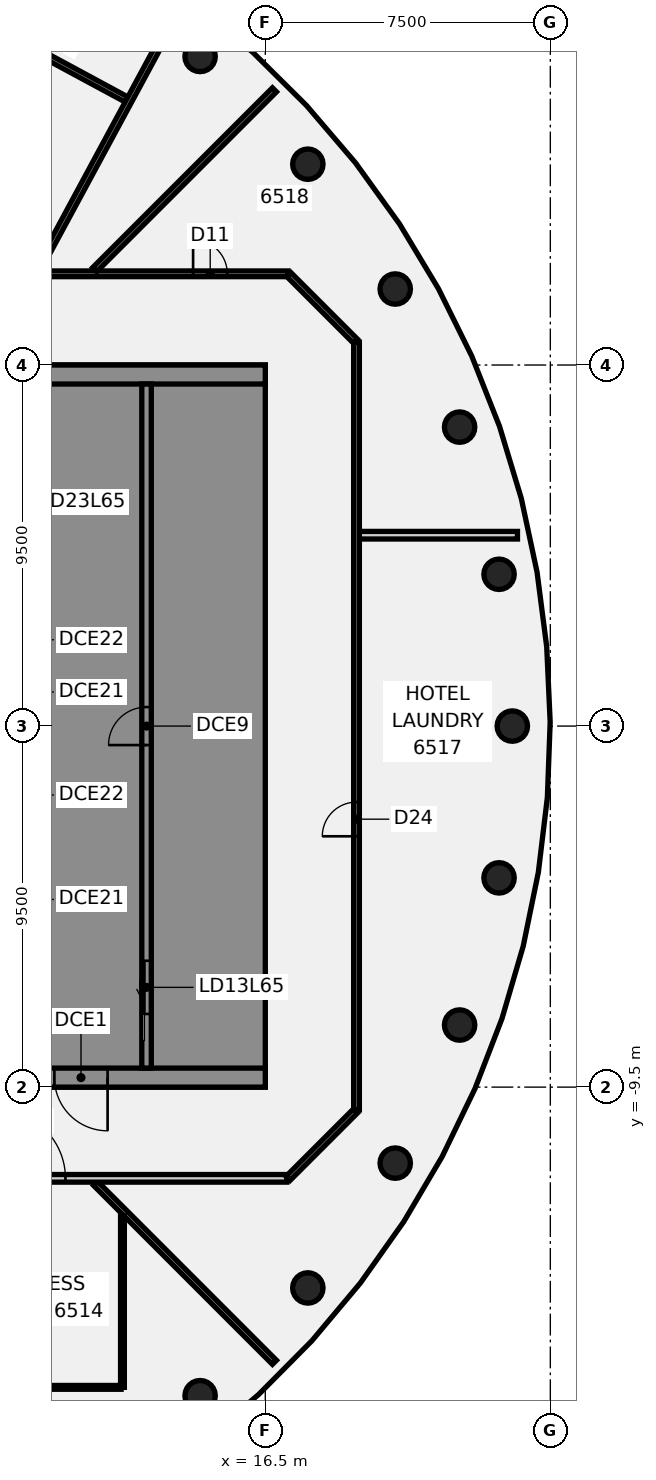
"""IFC4 building model, lengths in metres.
Left out: names, types, materials, properties, quantities, classifications, styles, units other than length and angle.
Written with IfcOpenShell. Run it as: python <this file> out.ifc"""

import sys

from ifc_helpers import new_model, si_unit, direction, frame, frame_2d, origin, origin_2d, place, context, subcontext, project, spatial, polyline, rectangle, circle, outline, extrude, element, fill, save


model = new_model("IFC4")
c1 = context("Model", 3, precision=1e-05, world=origin(), true_north=direction((0.0, 1.0)))
c2 = subcontext(c1, "Body", "Model", "MODEL_VIEW")
j1 = project(units=[si_unit("LENGTHUNIT", "METRE"), si_unit("PLANEANGLEUNIT", "RADIAN")], contexts=[c1])
p1 = place(None, origin())
s1 = spatial("IfcSite", under=j1, at=p1, CompositionType="ELEMENT")
p2 = place(p1, origin())
s2 = spatial("IfcBuilding", under=s1, at=p2, CompositionType="ELEMENT")
p3 = place(p2, frame((0.0, 0.0, 256.8)))
s3 = spatial("IfcBuildingStorey", under=s2, at=p3, CompositionType="ELEMENT", Elevation=256.8)
for number, where, z_axis, x_axis in (
    (1, (23.0, 0.0, -0.14), (0.0, 0.0, 1.0), (1.0, 0.0, 0.0)),
    (2, (22.651, 3.994, -0.14), (0.0, 0.0, 1.0), (1.0, 0.0, 0.0)),
    (3, (21.613, 7.866, -0.14), (0.0, 0.0, 1.0), (1.0, 0.0, 0.0)),
    (4, (19.919, 11.5, -0.14), (0.0, 0.0, 1.0), (1.0, 0.0, 0.0)),
    (5, (17.619, 14.784, -0.14), (0.0, 0.0, 1.0), (1.0, 0.0, 0.0)),
    (6, (14.784, 17.619, -0.14), (0.0, 0.0, 1.0), (1.0, 0.0, 0.0)),
    (7, (14.784, -17.619, -0.14), (0.0, 0.0, 1.0), (1.0, 0.0, 0.0)),
    (8, (17.619, -14.784, -0.14), (0.0, 0.0, 1.0), (1.0, 0.0, 0.0)),
    (9, (19.919, -11.5, -0.14), (0.0, 0.0, 1.0), (1.0, 0.0, 0.0)),
    (10, (21.613, -7.866, -0.14), (0.0, 0.0, 1.0), (1.0, 0.0, 0.0)),
    (11, (22.651, -3.994, -0.14), (0.0, 0.0, 1.0), (1.0, 0.0, 0.0)),
):
    element("IfcColumn", number, at=place(p3, frame(where, z_axis=z_axis, x_axis=x_axis)), inside=s3, PredefinedType="COLUMN", context=c2, shape_type="SweptSolid", body=[
        extrude(circle(Radius=0.4, at=origin_2d()), origin(), (0.0, 0.0, 1.0), 3.6),
    ])
p4 = place(p3, frame((12.034, -12.034, 0.0), z_axis=(0.0, 0.0, 1.0), x_axis=(0.707106781187, -0.707106781187, 0.0)))
e12 = element("IfcWall", 12, at=p4, inside=s3, PredefinedType="PARTITIONING", context=c2, shape_type="SweptSolid", body=[
    extrude(rectangle(XDim=6.655, YDim=0.15, at=frame_2d((3.328, 0.0))), origin(), (0.0, 0.0, 1.0), 2.864),
])
p5 = place(p3, frame((17.128, 11.872, 0.0), z_axis=(0.0, 0.0, 1.0), x_axis=(0.707106781187, -0.707106781187, 0.0)))
e13 = element("IfcWall", 13, at=p5, inside=s3, PredefinedType="PARTITIONING", context=c2, shape_type="SweptSolid", body=[
    extrude(rectangle(XDim=2.465, YDim=0.15, at=frame_2d((1.232, 0.0))), origin(), (0.0, 0.0, 1.0), 2.864),
])
p6 = place(p3, frame((0.302, 23.258, 0.0), z_axis=(0.0, 0.0, 1.0), x_axis=(0.88000876601, -0.474957442037, 0.0)))
e14 = element("IfcWall", 14, at=p6, inside=s3, PredefinedType="PARTITIONING", context=c2, shape_type="SweptSolid", body=[
    extrude(rectangle(XDim=14.256, YDim=0.15, at=frame_2d((7.128, 0.0))), origin(), (0.0, 0.0, 1.0), 2.864),
])
p7 = place(p6, frame((4.8, 0.0, 0.0)))
e15 = element("IfcOpeningElement", 15, at=p7, cuts=e14, PredefinedType="OPENING", context=c2, shape_type="SweptSolid", body=[
    extrude(rectangle(XDim=0.9, YDim=2.1, at=frame_2d((0.45, 1.05))), frame((0.0, 0.085, 0.0), z_axis=(0.0, -1.0, 0.0), x_axis=(1.0, 0.0, 0.0)), (0.0, 0.0, 1.0), 0.17),
])
p8 = place(p3, frame((-17.1, -11.9, 0.0), z_axis=(0.0, 0.0, 1.0), x_axis=(1.0, 0.0, 0.0)))
e16 = element("IfcWall", 16, at=p8, inside=s3, PredefinedType="PARTITIONING", context=c2, shape_type="SweptSolid", body=[
    extrude(rectangle(XDim=34.165, YDim=0.2, at=frame_2d((17.083, 0.0))), origin(), (0.0, 0.0, 1.0), 2.864),
])
p9 = place(p8, frame((6.1, 0.0, 0.0)))
e17 = element("IfcOpeningElement", 17, at=p9, cuts=e16, PredefinedType="OPENING", context=c2, shape_type="SweptSolid", body=[
    extrude(rectangle(XDim=0.9, YDim=2.1, at=frame_2d((0.45, 1.05))), frame((0.0, 0.11, 0.0), z_axis=(0.0, -1.0, 0.0), x_axis=(1.0, 0.0, 0.0)), (0.0, 0.0, 1.0), 0.22),
])
p10 = place(p8, frame((26.541, 0.0, 0.0)))
e18 = element("IfcOpeningElement", 18, at=p10, cuts=e16, PredefinedType="OPENING", context=c2, shape_type="SweptSolid", body=[
    extrude(rectangle(XDim=1.8, YDim=2.1, at=frame_2d((0.9, 1.05))), frame((0.0, 0.11, 0.0), z_axis=(0.0, -1.0, 0.0), x_axis=(1.0, 0.0, 0.0)), (0.0, 0.0, 1.0), 0.22),
])
p11 = place(p8, frame((17.778, 0.0, 0.0)))
e19 = element("IfcOpeningElement", 19, at=p11, cuts=e16, PredefinedType="OPENING", context=c2, shape_type="SweptSolid", body=[
    extrude(rectangle(XDim=1.8, YDim=2.1, at=frame_2d((0.9, 1.05))), frame((0.0, 0.11, 0.0), z_axis=(0.0, -1.0, 0.0), x_axis=(1.0, 0.0, 0.0)), (0.0, 0.0, 1.0), 0.22),
])
p12 = place(p8, frame((10.359, 0.0, 0.0)))
e20 = element("IfcOpeningElement", 20, at=p12, cuts=e16, PredefinedType="OPENING", context=c2, shape_type="SweptSolid", body=[
    extrude(rectangle(XDim=0.9, YDim=2.1, at=frame_2d((0.45, 1.05))), frame((0.0, 0.11, 0.0), z_axis=(0.0, -1.0, 0.0), x_axis=(1.0, 0.0, 0.0)), (0.0, 0.0, 1.0), 0.22),
])
p13 = place(p8, frame((1.65, 0.0, 0.0)))
e21 = element("IfcOpeningElement", 21, at=p13, cuts=e16, PredefinedType="OPENING", context=c2, shape_type="SweptSolid", body=[
    extrude(rectangle(XDim=0.9, YDim=2.1, at=frame_2d((0.45, 1.05))), frame((0.0, 0.11, 0.0), z_axis=(0.0, -1.0, 0.0), x_axis=(1.0, 0.0, 0.0)), (0.0, 0.0, 1.0), 0.22),
])
p14 = place(p3, frame((-17.065, 11.9, 0.0), z_axis=(0.0, 0.0, 1.0), x_axis=(1.0, 0.0, 0.0)))
e22 = element("IfcWall", 22, at=p14, inside=s3, PredefinedType="PARTITIONING", context=c2, shape_type="SweptSolid", body=[
    extrude(rectangle(XDim=34.165, YDim=0.15, at=frame_2d((17.083, 0.0))), origin(), (0.0, 0.0, 1.0), 2.864),
])
p15 = place(p14, frame((22.777, 0.0, 0.0)))
e23 = element("IfcOpeningElement", 23, at=p15, cuts=e22, PredefinedType="OPENING", context=c2, shape_type="SweptSolid", body=[
    extrude(rectangle(XDim=1.8, YDim=2.1, at=frame_2d((0.9, 1.05))), frame((0.0, 0.085, 0.0), z_axis=(0.0, -1.0, 0.0), x_axis=(1.0, 0.0, 0.0)), (0.0, 0.0, 1.0), 0.17),
])
p16 = place(p14, frame((31.665, 0.0, 0.0)))
e24 = element("IfcOpeningElement", 24, at=p16, cuts=e22, PredefinedType="OPENING", context=c2, shape_type="SweptSolid", body=[
    extrude(rectangle(XDim=0.9, YDim=2.1, at=frame_2d((0.45, 1.05))), frame((0.0, 0.085, 0.0), z_axis=(0.0, -1.0, 0.0), x_axis=(1.0, 0.0, 0.0)), (0.0, 0.0, 1.0), 0.17),
])
p17 = place(p14, frame((11.615, 0.0, 0.0)))
e25 = element("IfcOpeningElement", 25, at=p17, cuts=e22, PredefinedType="OPENING", context=c2, shape_type="SweptSolid", body=[
    extrude(rectangle(XDim=1.8, YDim=2.1, at=frame_2d((0.9, 1.05))), frame((0.0, 0.085, 0.0), z_axis=(0.0, -1.0, 0.0), x_axis=(1.0, 0.0, 0.0)), (0.0, 0.0, 1.0), 0.17),
])
p18 = place(p3, frame((8.276, -17.4, 0.0), z_axis=(0.0, 0.0, 1.0), x_axis=(1.0, 0.0, 0.0)))
e26 = element("IfcWall", 26, at=p18, inside=s3, PredefinedType="PARTITIONING", context=c2, shape_type="SweptSolid", body=[
    extrude(rectangle(XDim=4.43, YDim=0.1, at=frame_2d((2.215, 0.0))), origin(), (0.0, 0.0, 1.0), 2.864),
])
p19 = place(p3, frame((18.955, 5.022, 0.0), z_axis=(0.0, 0.0, 1.0), x_axis=(1.0, 0.0, 0.0)))
e27 = element("IfcWall", 27, at=p19, inside=s3, PredefinedType="PARTITIONING", context=c2, shape_type="SweptSolid", body=[
    extrude(rectangle(XDim=4.181, YDim=0.2, at=frame_2d((2.09, 0.0))), origin(), (0.0, 0.0, 1.0), 2.864),
])
p20 = place(p3, frame((12.01, 12.01, 0.0), z_axis=(0.0, 0.0, 1.0), x_axis=(0.707106781187, 0.707106781187, 0.0)))
e28 = element("IfcWall", 28, at=p20, inside=s3, PredefinedType="PARTITIONING", context=c2, shape_type="SweptSolid", body=[
    extrude(rectangle(XDim=6.691, YDim=0.15, at=frame_2d((3.345, 0.0))), origin(), (0.0, 0.0, 1.0), 2.864),
])
p21 = place(p3, frame((17.1, -11.9, 0.0), z_axis=(0.0, 0.0, 1.0), x_axis=(0.707106781187, 0.707106781187, 0.0)))
e29 = element("IfcWall", 29, at=p21, inside=s3, PredefinedType="PARTITIONING", context=c2, shape_type="SweptSolid", body=[
    extrude(rectangle(XDim=2.505, YDim=0.15, at=frame_2d((1.253, 0.0))), origin(), (0.0, 0.0, 1.0), 2.864),
])
p22 = place(p3, frame((10.508, 11.992, 0.0), z_axis=(0.0, 0.0, 1.0), x_axis=(0.474916972047, 0.88003060723, 0.0)))
e30 = element("IfcWall", 30, at=p22, inside=s3, PredefinedType="PARTITIONING", context=c2, shape_type="SweptSolid", body=[
    extrude(rectangle(XDim=7.873, YDim=0.15, at=frame_2d((3.937, 0.0))), origin(), (0.0, 0.0, 1.0), 2.864),
])
p23 = place(p3, frame((12.741, -17.4, 0.0), z_axis=(0.0, 0.0, 1.0), x_axis=(0.0, 1.0, 0.0)))
e31 = element("IfcWall", 31, at=p23, inside=s3, PredefinedType="PARTITIONING", context=c2, shape_type="SweptSolid", body=[
    extrude(rectangle(XDim=4.519, YDim=0.1, at=frame_2d((2.259, 0.0))), origin(), (0.0, 0.0, 1.0), 2.864),
])
p24 = place(p3, frame((18.9, -10.1, 0.0), z_axis=(0.0, 0.0, 1.0), x_axis=(0.0, 1.0, 0.0)))
e32 = element("IfcWall", 32, at=p24, inside=s3, PredefinedType="PARTITIONING", context=c2, shape_type="SweptSolid", body=[
    extrude(rectangle(XDim=20.2, YDim=0.15, at=frame_2d((10.1, 0.0))), origin(), (0.0, 0.0, 1.0), 2.864),
])
p25 = place(p24, frame((7.2, 0.0, 0.0)))
e33 = element("IfcOpeningElement", 33, at=p25, cuts=e32, PredefinedType="OPENING", context=c2, shape_type="SweptSolid", body=[
    extrude(rectangle(XDim=0.9, YDim=2.1, at=frame_2d((0.45, 1.05))), frame((0.0, 0.085, 0.0), z_axis=(0.0, -1.0, 0.0), x_axis=(1.0, 0.0, 0.0)), (0.0, 0.0, 1.0), 0.17),
])
p26 = place(p3, frame((16.5, -9.25, 0.0), z_axis=(0.0, 0.0, 1.0), x_axis=(-1.0, 0.0, 0.0)))
e34 = element("IfcWall", 34, at=p26, inside=s3, PredefinedType="SHEAR", context=c2, shape_type="SweptSolid", body=[
    extrude(rectangle(XDim=13.0, YDim=0.5, at=frame_2d((6.5, 0.0))), origin(), (0.0, 0.0, 1.0), 3.46),
])
p27 = place(p26, frame((4.15, 0.0, 0.0)))
e35 = element("IfcOpeningElement", 35, at=p27, cuts=e34, PredefinedType="OPENING", context=c2, shape_type="SweptSolid", body=[
    extrude(rectangle(XDim=1.4, YDim=2.1, at=frame_2d((0.7, 1.05))), frame((0.0, 0.26, 0.0), z_axis=(0.0, -1.0, 0.0), x_axis=(1.0, 0.0, 0.0)), (0.0, 0.0, 1.0), 0.52),
])
p28 = place(p26, frame((10.125, 0.0, 0.0)))
e36 = element("IfcOpeningElement", 36, at=p28, cuts=e34, PredefinedType="OPENING", context=c2, shape_type="SweptSolid", body=[
    extrude(rectangle(XDim=1.4, YDim=2.1, at=frame_2d((0.7, 1.05))), frame((0.0, 0.26, 0.0), z_axis=(0.0, -1.0, 0.0), x_axis=(1.0, 0.0, 0.0)), (0.0, 0.0, 1.0), 0.52),
])
p29 = place(p3, origin())
e37 = element("IfcWall", 37, at=p29, inside=s3, PredefinedType="SHEAR", context=c2, shape_type="SweptSolid", body=[
    extrude(outline(polyline([(13.5, -8.125), (13.5, -9.0), (16.0, -9.0), (16.5, -9.0), (16.5, 9.0), (16.0, 9.0), (13.5, 9.0), (13.5, 8.125), (16.0, 8.125), (16.0, 5.625), (13.5, 5.625), (13.5, 5.375), (16.0, 5.375), (16.0, -5.375), (13.5, -5.375), (13.5, -5.625), (16.0, -5.625), (16.0, -8.125), (13.5, -8.125)])), origin(), (0.0, 0.0, 1.0), 3.46),
])
p30 = place(p3, frame((16.5, 9.25, 0.0), z_axis=(0.0, 0.0, 1.0), x_axis=(-1.0, 0.0, 0.0)))
e38 = element("IfcWall", 38, at=p30, inside=s3, PredefinedType="SHEAR", context=c2, shape_type="SweptSolid", body=[
    extrude(rectangle(XDim=13.0, YDim=0.5, at=frame_2d((6.5, 0.0))), origin(), (0.0, 0.0, 1.0), 3.46),
])
p31 = place(p3, frame((13.375, -9.0, 0.0), z_axis=(0.0, 0.0, 1.0), x_axis=(0.0, 1.0, 0.0)))
e39 = element("IfcWall", 39, at=p31, inside=s3, PredefinedType="SHEAR", context=c2, shape_type="SweptSolid", body=[
    extrude(rectangle(XDim=18.0, YDim=0.25, at=frame_2d((9.0, 0.0))), origin(), (0.0, 0.0, 1.0), 3.46),
])
p32 = place(p31, frame((1.425, 0.0, 0.0)))
e40 = element("IfcOpeningElement", 40, at=p32, cuts=e39, PredefinedType="OPENING", context=c2, shape_type="SweptSolid", body=[
    extrude(rectangle(XDim=1.4, YDim=2.1, at=frame_2d((0.7, 1.05))), frame((0.0, 0.135, 0.0), z_axis=(0.0, -1.0, 0.0), x_axis=(1.0, 0.0, 0.0)), (0.0, 0.0, 1.0), 0.27),
])
p33 = place(p31, frame((8.5, 0.0, 0.0)))
e41 = element("IfcOpeningElement", 41, at=p33, cuts=e39, PredefinedType="OPENING", context=c2, shape_type="SweptSolid", body=[
    extrude(rectangle(XDim=1.0, YDim=2.1, at=frame_2d((0.5, 1.05))), frame((0.0, 0.135, 0.0), z_axis=(0.0, -1.0, 0.0), x_axis=(1.0, 0.0, 0.0)), (0.0, 0.0, 1.0), 0.27),
])
p34 = place(p10, frame((1.8, 0.0, 0.0), z_axis=(0.0, 0.0, 1.0), x_axis=(-1.0, 0.0, 0.0)))
e42 = element("IfcDoor", 42, at=p34, inside=s3, OperationType="DOUBLE_DOOR_SINGLE_SWING", PredefinedType="DOOR", context=c2, shape_type="SweptSolid", body=[
    extrude(rectangle(XDim=1.8, YDim=2.1, at=frame_2d((0.9, 1.05))), frame((0.0, 0.025, 0.0), z_axis=(0.0, -1.0, 0.0), x_axis=(1.0, 0.0, 0.0)), (0.0, 0.0, 1.0), 0.05),
])
fill(e18, e42)
p35 = place(p16, origin())
e43 = element("IfcDoor", 43, at=p35, inside=s3, OperationType="SINGLE_SWING_LEFT", PredefinedType="DOOR", context=c2, shape_type="SweptSolid", body=[
    extrude(rectangle(XDim=0.9, YDim=2.1, at=frame_2d((0.45, 1.05))), frame((0.0, 0.025, 0.0), z_axis=(0.0, -1.0, 0.0), x_axis=(1.0, 0.0, 0.0)), (0.0, 0.0, 1.0), 0.05),
])
fill(e24, e43)
p36 = place(p25, frame((0.9, 0.0, 0.0), z_axis=(0.0, 0.0, 1.0), x_axis=(-1.0, 0.0, 0.0)))
e44 = element("IfcDoor", 44, at=p36, inside=s3, OperationType="SINGLE_SWING_LEFT", PredefinedType="DOOR", context=c2, shape_type="SweptSolid", body=[
    extrude(rectangle(XDim=0.9, YDim=2.1, at=frame_2d((0.45, 1.05))), frame((0.0, 0.025, 0.0), z_axis=(0.0, -1.0, 0.0), x_axis=(1.0, 0.0, 0.0)), (0.0, 0.0, 1.0), 0.05),
])
fill(e33, e44)
p37 = place(p27, origin())
e45 = element("IfcDoor", 45, at=p37, inside=s3, OperationType="SINGLE_SWING_LEFT", PredefinedType="DOOR", context=c2, shape_type="SweptSolid", body=[
    extrude(rectangle(XDim=1.4, YDim=2.1, at=frame_2d((0.7, 1.05))), frame((0.0, 0.025, 0.0), z_axis=(0.0, -1.0, 0.0), x_axis=(1.0, 0.0, 0.0)), (0.0, 0.0, 1.0), 0.05),
])
fill(e35, e45)
p38 = place(p32, origin())
e46 = element("IfcDoor", 46, at=p38, inside=s3, OperationType="SLIDING_TO_LEFT", PredefinedType="DOOR", context=c2, shape_type="SweptSolid", body=[
    extrude(rectangle(XDim=1.4, YDim=2.1, at=frame_2d((0.7, 1.05))), frame((0.0, 0.025, 0.0), z_axis=(0.0, -1.0, 0.0), x_axis=(1.0, 0.0, 0.0)), (0.0, 0.0, 1.0), 0.05),
])
fill(e40, e46)
p39 = place(p33, origin())
e47 = element("IfcDoor", 47, at=p39, inside=s3, OperationType="SINGLE_SWING_LEFT", PredefinedType="DOOR", context=c2, shape_type="SweptSolid", body=[
    extrude(rectangle(XDim=1.0, YDim=2.1, at=frame_2d((0.5, 1.05))), frame((0.0, 0.025, 0.0), z_axis=(0.0, -1.0, 0.0), x_axis=(1.0, 0.0, 0.0)), (0.0, 0.0, 1.0), 0.05),
])
fill(e41, e47)
save(model, sys.argv[1])
